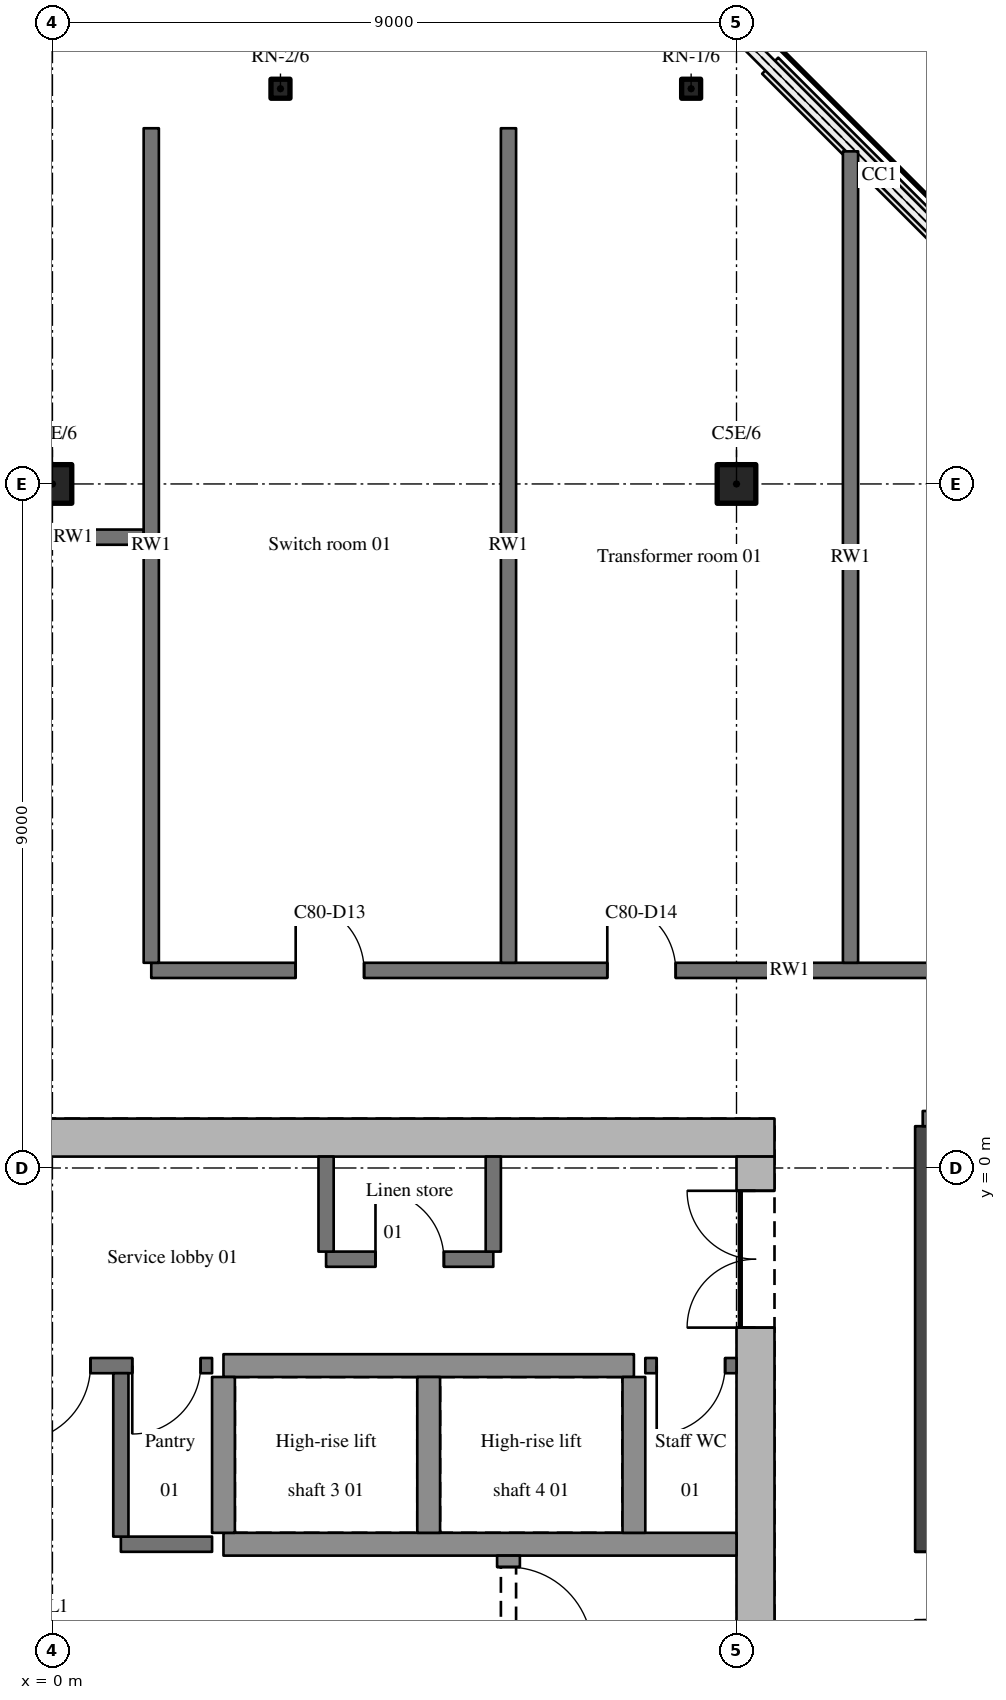
"""IFC4 building model, lengths in metres.
Left out: names, types, materials, properties, quantities, classifications, styles, units other than length and angle.
Written with IfcOpenShell. Run it as: python <this file> out.ifc"""

import sys

from ifc_helpers import new_model, si_unit, direction, frame, frame_2d, origin, origin_2d, place, context, subcontext, project, spatial, polyline, rectangle, hollow_rectangle, hollow_circle, outline, extrude, element, fill, save


model = new_model("IFC4")
c1 = context("Model", 3, precision=1e-05, world=origin(), true_north=direction((0.0, 1.0)))
c2 = subcontext(c1, "Body", "Model", "MODEL_VIEW")
j1 = project(units=[si_unit("LENGTHUNIT", "METRE"), si_unit("PLANEANGLEUNIT", "RADIAN")], contexts=[c1])
p1 = place(None, origin())
s1 = spatial("IfcSite", under=j1, at=p1, CompositionType="ELEMENT")
p2 = place(p1, origin())
s2 = spatial("IfcBuilding", under=s1, at=p2, CompositionType="ELEMENT")
p3 = place(p2, frame((0.0, 0.0, 297.3)))
s3 = spatial("IfcBuildingStorey", under=s2, at=p3, CompositionType="ELEMENT", Elevation=297.3)
for number, where, z_axis, x_axis in (
    (1, (0.0, 9.0, 0.0), (0.0, 0.0, 1.0), (1.0, 0.0, 0.0)),
    (2, (9.0, 9.0, 0.0), (0.0, 0.0, 1.0), (1.0, 0.0, 0.0)),
):
    element("IfcColumn", number, at=place(p3, frame(where, z_axis=z_axis, x_axis=x_axis)), inside=s3, PredefinedType="COLUMN", context=c2, shape_type="SweptSolid", body=[
        extrude(hollow_circle(Radius=0.254, WallThickness=0.025, at=origin_2d()), origin(), (0.0, 0.0, 1.0), 3.6),
    ])
for number, where, z_axis, x_axis in (
    (3, (8.403, 14.2, 0.0), (0.0, 0.0, 1.0), (1.0, 0.0, 0.0)),
    (4, (3.0, 14.2, 0.0), (0.0, 0.0, 1.0), (1.0, 0.0, 0.0)),
):
    element("IfcColumn", number, at=place(p3, frame(where, z_axis=z_axis, x_axis=x_axis)), inside=s3, PredefinedType="COLUMN", context=c2, shape_type="SweptSolid", body=[
        extrude(hollow_rectangle(XDim=0.25, YDim=0.25, WallThickness=0.02, InnerFilletRadius=0.03, OuterFilletRadius=0.05, at=origin_2d()), origin(), (0.0, 0.0, 1.0), 3.114),
    ])
p4 = place(p3, frame((-9.5, 0.4, 0.0), z_axis=(0.0, 0.0, 1.0), x_axis=(1.0, 0.0, 0.0)))
e5 = element("IfcWall", 5, at=p4, inside=s3, PredefinedType="SHEAR", context=c2, shape_type="SweptSolid", body=[
    extrude(outline(polyline([(0.0, 0.0), (19.0, 0.0), (19.0, 3.6), (0.0, 3.6), (0.0, 0.0)])), frame((0.0, 0.25, 0.0), z_axis=(0.0, -1.0, 0.0), x_axis=(1.0, 0.0, 0.0)), (0.0, 0.0, 1.0), 0.5),
])
p5 = place(p3, frame((9.25, -11.5, 0.0), z_axis=(0.0, 0.0, 1.0), x_axis=(0.0, 1.0, 0.0)))
e6 = element("IfcWall", 6, at=p5, inside=s3, PredefinedType="SHEAR", context=c2, shape_type="SweptSolid", body=[
    extrude(outline(polyline([(0.0, 0.0), (11.65, 0.0), (11.65, 3.6), (0.0, 3.6), (0.0, 0.0)])), frame((0.0, 0.25, 0.0), z_axis=(0.0, -1.0, 0.0), x_axis=(1.0, 0.0, 0.0)), (0.0, 0.0, 1.0), 0.5),
])
p6 = place(p5, frame((9.4, 0.0, 0.0)))
e7 = element("IfcOpeningElement", 7, at=p6, cuts=e6, PredefinedType="OPENING", context=c2, shape_type="SweptSolid", body=[
    extrude(rectangle(XDim=1.8, YDim=2.1, at=frame_2d((0.9, 1.05))), frame((0.0, 0.26, 0.0), z_axis=(0.0, -1.0, 0.0), x_axis=(1.0, 0.0, 0.0)), (0.0, 0.0, 1.0), 0.52),
])
p7 = place(p3, frame((0.9, -4.95, 0.0), z_axis=(0.0, 0.0, 1.0), x_axis=(1.0, 0.0, 0.0)))
e8 = element("IfcWall", 8, at=p7, inside=s3, PredefinedType="SOLIDWALL", context=c2, shape_type="SweptSolid", body=[
    extrude(rectangle(XDim=1.2, YDim=0.2, at=frame_2d((0.6, 0.0))), origin(), (0.0, 0.0, 1.0), 3.3),
])
p8 = place(p3, frame((2.25, -4.95, 0.0), z_axis=(0.0, 0.0, 1.0), x_axis=(1.0, 0.0, 0.0)))
e9 = element("IfcWall", 9, at=p8, inside=s3, PredefinedType="SHEAR", context=c2, shape_type="SweptSolid", body=[
    extrude(rectangle(XDim=6.75, YDim=0.3, at=frame_2d((3.375, 0.0))), origin(), (0.0, 0.0, 1.0), 3.6),
])
p9 = place(p3, frame((2.1, -2.6, 0.0), z_axis=(0.0, 0.0, 1.0), x_axis=(-1.0, 0.0, 0.0)))
e10 = element("IfcWall", 10, at=p9, inside=s3, PredefinedType="SOLIDWALL", context=c2, shape_type="SweptSolid", body=[
    extrude(rectangle(XDim=4.2, YDim=0.2, at=frame_2d((2.1, 0.0))), origin(), (0.0, 0.0, 1.0), 3.3),
])
p10 = place(p9, frame((1.6, 0.0, 0.0)))
e11 = element("IfcOpeningElement", 11, at=p10, cuts=e10, PredefinedType="OPENING", context=c2, shape_type="SweptSolid", body=[
    extrude(rectangle(XDim=1.0, YDim=2.1, at=frame_2d((0.5, 1.05))), frame((0.0, 0.11, 0.0), z_axis=(0.0, -1.0, 0.0), x_axis=(1.0, 0.0, 0.0)), (0.0, 0.0, 1.0), 0.22),
])
p11 = place(p9, frame((3.15, 0.0, 0.0)))
e12 = element("IfcOpeningElement", 12, at=p11, cuts=e10, PredefinedType="OPENING", context=c2, shape_type="SweptSolid", body=[
    extrude(rectangle(XDim=0.9, YDim=2.1, at=frame_2d((0.45, 1.05))), frame((0.0, 0.11, 0.0), z_axis=(0.0, -1.0, 0.0), x_axis=(1.0, 0.0, 0.0)), (0.0, 0.0, 1.0), 0.22),
])
p12 = place(p9, frame((0.15, 0.0, 0.0)))
e13 = element("IfcOpeningElement", 13, at=p12, cuts=e10, PredefinedType="OPENING", context=c2, shape_type="SweptSolid", body=[
    extrude(rectangle(XDim=0.9, YDim=2.1, at=frame_2d((0.45, 1.05))), frame((0.0, 0.11, 0.0), z_axis=(0.0, -1.0, 0.0), x_axis=(1.0, 0.0, 0.0)), (0.0, 0.0, 1.0), 0.22),
])
p13 = place(p3, frame((2.25, -2.6, 0.0), z_axis=(0.0, 0.0, 1.0), x_axis=(1.0, 0.0, 0.0)))
e14 = element("IfcWall", 14, at=p13, inside=s3, PredefinedType="SHEAR", context=c2, shape_type="SweptSolid", body=[
    extrude(rectangle(XDim=5.4, YDim=0.3, at=frame_2d((2.7, 0.0))), origin(), (0.0, 0.0, 1.0), 3.6),
])
p14 = place(p3, frame((9.0, -2.6, 0.0), z_axis=(0.0, 0.0, 1.0), x_axis=(-1.0, 0.0, 0.0)))
e15 = element("IfcWall", 15, at=p14, inside=s3, PredefinedType="SOLIDWALL", context=c2, shape_type="SweptSolid", body=[
    extrude(rectangle(XDim=1.2, YDim=0.2, at=frame_2d((0.6, 0.0))), origin(), (0.0, 0.0, 1.0), 3.3),
])
p15 = place(p14, frame((0.15, 0.0, 0.0)))
e16 = element("IfcOpeningElement", 16, at=p15, cuts=e15, PredefinedType="OPENING", context=c2, shape_type="SweptSolid", body=[
    extrude(rectangle(XDim=0.9, YDim=2.1, at=frame_2d((0.45, 1.05))), frame((0.0, 0.11, 0.0), z_axis=(0.0, -1.0, 0.0), x_axis=(1.0, 0.0, 0.0)), (0.0, 0.0, 1.0), 0.22),
])
p16 = place(p3, frame((3.6, -1.2, 0.0), z_axis=(0.0, 0.0, 1.0), x_axis=(1.0, 0.0, 0.0)))
e17 = element("IfcWall", 17, at=p16, inside=s3, PredefinedType="SOLIDWALL", context=c2, shape_type="SweptSolid", body=[
    extrude(rectangle(XDim=2.2, YDim=0.2, at=frame_2d((1.1, 0.0))), origin(), (0.0, 0.0, 1.0), 3.3),
])
p17 = place(p16, frame((0.65, 0.0, 0.0)))
e18 = element("IfcOpeningElement", 18, at=p17, cuts=e17, PredefinedType="OPENING", context=c2, shape_type="SweptSolid", body=[
    extrude(rectangle(XDim=0.9, YDim=2.1, at=frame_2d((0.45, 1.05))), frame((0.0, 0.11, 0.0), z_axis=(0.0, -1.0, 0.0), x_axis=(1.0, 0.0, 0.0)), (0.0, 0.0, 1.0), 0.22),
])
p18 = place(p3, frame((18.1, 0.65, 0.0), z_axis=(0.0, 0.0, 1.0), x_axis=(-1.0, 0.0, 0.0)))
e19 = element("IfcWall", 19, at=p18, inside=s3, PredefinedType="SOLIDWALL", context=c2, shape_type="SweptSolid", body=[
    extrude(rectangle(XDim=6.65, YDim=0.2, at=frame_2d((3.325, 0.0))), origin(), (0.0, 0.0, 1.0), 2.66),
])
p19 = place(p18, frame((2.875, 0.0, 0.0)))
e20 = element("IfcOpeningElement", 20, at=p19, cuts=e19, PredefinedType="OPENING", context=c2, shape_type="SweptSolid", body=[
    extrude(rectangle(XDim=0.9, YDim=2.1, at=frame_2d((0.45, 1.05))), frame((0.0, 0.11, 0.0), z_axis=(0.0, -1.0, 0.0), x_axis=(1.0, 0.0, 0.0)), (0.0, 0.0, 1.0), 0.22),
])
p20 = place(p3, frame((1.3, 2.6, 0.0), z_axis=(0.0, 0.0, 1.0), x_axis=(1.0, 0.0, 0.0)))
e21 = element("IfcWall", 21, at=p20, inside=s3, PredefinedType="SOLIDWALL", context=c2, shape_type="SweptSolid", body=[
    extrude(rectangle(XDim=16.8, YDim=0.2, at=frame_2d((8.4, 0.0))), origin(), (0.0, 0.0, 1.0), 2.66),
])
p21 = place(p20, frame((1.9, 0.0, 0.0)))
e22 = element("IfcOpeningElement", 22, at=p21, cuts=e21, PredefinedType="OPENING", context=c2, shape_type="SweptSolid", body=[
    extrude(rectangle(XDim=0.9, YDim=2.1, at=frame_2d((0.45, 1.05))), frame((0.0, 0.11, 0.0), z_axis=(0.0, -1.0, 0.0), x_axis=(1.0, 0.0, 0.0)), (0.0, 0.0, 1.0), 0.22),
])
p22 = place(p20, frame((6.0, 0.0, 0.0)))
e23 = element("IfcOpeningElement", 23, at=p22, cuts=e21, PredefinedType="OPENING", context=c2, shape_type="SweptSolid", body=[
    extrude(rectangle(XDim=0.9, YDim=2.1, at=frame_2d((0.45, 1.05))), frame((0.0, 0.11, 0.0), z_axis=(0.0, -1.0, 0.0), x_axis=(1.0, 0.0, 0.0)), (0.0, 0.0, 1.0), 0.22),
])
p23 = place(p20, frame((13.025, 0.0, 0.0)))
e24 = element("IfcOpeningElement", 24, at=p23, cuts=e21, PredefinedType="OPENING", context=c2, shape_type="SweptSolid", body=[
    extrude(rectangle(XDim=0.9, YDim=2.1, at=frame_2d((0.45, 1.05))), frame((0.0, 0.11, 0.0), z_axis=(0.0, -1.0, 0.0), x_axis=(1.0, 0.0, 0.0)), (0.0, 0.0, 1.0), 0.22),
])
p24 = place(p3, frame((-0.65, 8.3, 0.0), z_axis=(0.0, 0.0, 1.0), x_axis=(1.0, 0.0, 0.0)))
e25 = element("IfcWall", 25, at=p24, inside=s3, PredefinedType="SOLIDWALL", context=c2, shape_type="SweptSolid", body=[
    extrude(rectangle(XDim=1.85, YDim=0.2, at=frame_2d((0.925, 0.0))), origin(), (0.0, 0.0, 1.0), 2.66),
])
p25 = place(p3, frame((0.9, -4.85, 0.0), z_axis=(0.0, 0.0, 1.0), x_axis=(0.0, 1.0, 0.0)))
e26 = element("IfcWall", 26, at=p25, inside=s3, PredefinedType="SOLIDWALL", context=c2, shape_type="SweptSolid", body=[
    extrude(rectangle(XDim=2.15, YDim=0.2, at=frame_2d((1.075, 0.0))), origin(), (0.0, 0.0, 1.0), 3.3),
])
p26 = place(p3, frame((1.3, 2.7, 0.0), z_axis=(0.0, 0.0, 1.0), x_axis=(0.0, 1.0, 0.0)))
e27 = element("IfcWall", 27, at=p26, inside=s3, PredefinedType="SOLIDWALL", context=c2, shape_type="SweptSolid", body=[
    extrude(rectangle(XDim=10.98, YDim=0.2, at=frame_2d((5.49, 0.0))), origin(), (0.0, 0.0, 1.0), 2.66),
])
p27 = place(p3, frame((2.25, -4.8, 0.0), z_axis=(0.0, 0.0, 1.0), x_axis=(0.0, 1.0, 0.0)))
e28 = element("IfcWall", 28, at=p27, inside=s3, PredefinedType="SHEAR", context=c2, shape_type="SweptSolid", body=[
    extrude(rectangle(XDim=2.05, YDim=0.3, at=frame_2d((1.025, 0.0))), origin(), (0.0, 0.0, 1.0), 3.6),
])
p28 = place(p3, frame((3.6, -1.1, 0.0), z_axis=(0.0, 0.0, 1.0), x_axis=(0.0, 1.0, 0.0)))
e29 = element("IfcWall", 29, at=p28, inside=s3, PredefinedType="SOLIDWALL", context=c2, shape_type="SweptSolid", body=[
    extrude(rectangle(XDim=1.25, YDim=0.2, at=frame_2d((0.625, 0.0))), origin(), (0.0, 0.0, 1.0), 3.3),
])
p29 = place(p3, frame((4.95, -4.8, 0.0), z_axis=(0.0, 0.0, 1.0), x_axis=(0.0, 1.0, 0.0)))
e30 = element("IfcWall", 30, at=p29, inside=s3, PredefinedType="SHEAR", context=c2, shape_type="SweptSolid", body=[
    extrude(rectangle(XDim=2.05, YDim=0.3, at=frame_2d((1.025, 0.0))), origin(), (0.0, 0.0, 1.0), 3.6),
])
p30 = place(p3, frame((5.8, -1.1, 0.0), z_axis=(0.0, 0.0, 1.0), x_axis=(0.0, 1.0, 0.0)))
e31 = element("IfcWall", 31, at=p30, inside=s3, PredefinedType="SOLIDWALL", context=c2, shape_type="SweptSolid", body=[
    extrude(rectangle(XDim=1.25, YDim=0.2, at=frame_2d((0.625, 0.0))), origin(), (0.0, 0.0, 1.0), 3.3),
])
p31 = place(p3, frame((6.0, -5.1, 0.0), z_axis=(0.0, 0.0, 1.0), x_axis=(0.0, -1.0, 0.0)))
e32 = element("IfcWall", 32, at=p31, inside=s3, PredefinedType="SHEAR", context=c2, shape_type="SweptSolid", body=[
    extrude(rectangle(XDim=6.4, YDim=0.3, at=frame_2d((3.2, 0.0))), origin(), (0.0, 0.0, 1.0), 3.6),
])
p32 = place(p31, frame((0.15, 0.0, 0.0)))
e33 = element("IfcOpeningElement", 33, at=p32, cuts=e32, PredefinedType="OPENING", context=c2, shape_type="SweptSolid", body=[
    extrude(rectangle(XDim=1.1, YDim=2.1, at=frame_2d((0.55, 1.05))), frame((0.0, 0.16, 0.0), z_axis=(0.0, -1.0, 0.0), x_axis=(1.0, 0.0, 0.0)), (0.0, 0.0, 1.0), 0.32),
])
p33 = place(p3, frame((6.0, 2.7, 0.0), z_axis=(0.0, 0.0, 1.0), x_axis=(0.0, 1.0, 0.0)))
e34 = element("IfcWall", 34, at=p33, inside=s3, PredefinedType="SOLIDWALL", context=c2, shape_type="SweptSolid", body=[
    extrude(rectangle(XDim=10.98, YDim=0.2, at=frame_2d((5.49, 0.0))), origin(), (0.0, 0.0, 1.0), 2.66),
])
p34 = place(p3, frame((7.65, -4.8, 0.0), z_axis=(0.0, 0.0, 1.0), x_axis=(0.0, 1.0, 0.0)))
e35 = element("IfcWall", 35, at=p34, inside=s3, PredefinedType="SHEAR", context=c2, shape_type="SweptSolid", body=[
    extrude(rectangle(XDim=2.05, YDim=0.3, at=frame_2d((1.025, 0.0))), origin(), (0.0, 0.0, 1.0), 3.6),
])
p35 = place(p3, frame((10.5, 2.7, 0.0), z_axis=(0.0, 0.0, 1.0), x_axis=(0.0, 1.0, 0.0)))
e36 = element("IfcWall", 36, at=p35, inside=s3, PredefinedType="SOLIDWALL", context=c2, shape_type="SweptSolid", body=[
    extrude(rectangle(XDim=10.676, YDim=0.2, at=frame_2d((5.338, 0.0))), origin(), (0.0, 0.0, 1.0), 2.66),
])
p36 = place(p3, frame((11.45, 0.55, 0.0), z_axis=(0.0, 0.0, 1.0), x_axis=(0.0, -1.0, 0.0)))
e37 = element("IfcWall", 37, at=p36, inside=s3, PredefinedType="SOLIDWALL", context=c2, shape_type="SweptSolid", body=[
    extrude(rectangle(XDim=15.65, YDim=0.2, at=frame_2d((7.825, 0.0))), origin(), (0.0, 0.0, 1.0), 2.46),
])
p37 = place(p36, frame((13.65, 0.0, 0.0)))
e38 = element("IfcOpeningElement", 38, at=p37, cuts=e37, PredefinedType="OPENING", context=c2, shape_type="SweptSolid", body=[
    extrude(rectangle(XDim=0.9, YDim=2.1, at=frame_2d((0.45, 1.05))), frame((0.0, 0.11, 0.0), z_axis=(0.0, -1.0, 0.0), x_axis=(1.0, 0.0, 0.0)), (0.0, 0.0, 1.0), 0.22),
])
p38 = place(p36, frame((5.6, 0.0, 0.0)))
e39 = element("IfcOpeningElement", 39, at=p38, cuts=e37, PredefinedType="OPENING", context=c2, shape_type="SweptSolid", body=[
    extrude(rectangle(XDim=0.9, YDim=2.1, at=frame_2d((0.45, 1.05))), frame((0.0, 0.11, 0.0), z_axis=(0.0, -1.0, 0.0), x_axis=(1.0, 0.0, 0.0)), (0.0, 0.0, 1.0), 0.22),
])
p39 = place(p6, origin())
e40 = element("IfcDoor", 40, at=p39, inside=s3, OperationType="DOUBLE_DOOR_SINGLE_SWING", PredefinedType="DOOR", context=c2, shape_type="SweptSolid", body=[
    extrude(rectangle(XDim=1.8, YDim=2.1, at=frame_2d((0.9, 1.05))), frame((0.0, 0.025, 0.0), z_axis=(0.0, -1.0, 0.0), x_axis=(1.0, 0.0, 0.0)), (0.0, 0.0, 1.0), 0.05),
])
fill(e7, e40)
p40 = place(p10, origin())
e41 = element("IfcDoor", 41, at=p40, inside=s3, OperationType="SINGLE_SWING_RIGHT", PredefinedType="DOOR", context=c2, shape_type="SweptSolid", body=[
    extrude(rectangle(XDim=1.0, YDim=2.1, at=frame_2d((0.5, 1.05))), frame((0.0, 0.025, 0.0), z_axis=(0.0, -1.0, 0.0), x_axis=(1.0, 0.0, 0.0)), (0.0, 0.0, 1.0), 0.05),
])
fill(e11, e41)
p41 = place(p32, origin())
e42 = element("IfcDoor", 42, at=p41, inside=s3, OperationType="SINGLE_SWING_RIGHT", PredefinedType="DOOR", context=c2, shape_type="SweptSolid", body=[
    extrude(rectangle(XDim=1.1, YDim=2.1, at=frame_2d((0.55, 1.05))), frame((0.0, 0.025, 0.0), z_axis=(0.0, -1.0, 0.0), x_axis=(1.0, 0.0, 0.0)), (0.0, 0.0, 1.0), 0.05),
])
fill(e33, e42)
p42 = place(p12, origin())
e43 = element("IfcDoor", 43, at=p42, inside=s3, OperationType="SINGLE_SWING_RIGHT", PredefinedType="DOOR", context=c2, shape_type="SweptSolid", body=[
    extrude(rectangle(XDim=0.9, YDim=2.1, at=frame_2d((0.45, 1.05))), frame((0.0, 0.025, 0.0), z_axis=(0.0, -1.0, 0.0), x_axis=(1.0, 0.0, 0.0)), (0.0, 0.0, 1.0), 0.05),
])
fill(e13, e43)
p43 = place(p15, origin())
e44 = element("IfcDoor", 44, at=p43, inside=s3, OperationType="SINGLE_SWING_RIGHT", PredefinedType="DOOR", context=c2, shape_type="SweptSolid", body=[
    extrude(rectangle(XDim=0.9, YDim=2.1, at=frame_2d((0.45, 1.05))), frame((0.0, 0.025, 0.0), z_axis=(0.0, -1.0, 0.0), x_axis=(1.0, 0.0, 0.0)), (0.0, 0.0, 1.0), 0.05),
])
fill(e16, e44)
p44 = place(p38, origin())
e45 = element("IfcDoor", 45, at=p44, inside=s3, OperationType="SINGLE_SWING_RIGHT", PredefinedType="DOOR", context=c2, shape_type="SweptSolid", body=[
    extrude(rectangle(XDim=0.9, YDim=2.1, at=frame_2d((0.45, 1.05))), frame((0.0, 0.025, 0.0), z_axis=(0.0, -1.0, 0.0), x_axis=(1.0, 0.0, 0.0)), (0.0, 0.0, 1.0), 0.05),
])
fill(e39, e45)
p45 = place(p21, origin())
e46 = element("IfcDoor", 46, at=p45, inside=s3, OperationType="SINGLE_SWING_LEFT", PredefinedType="DOOR", context=c2, shape_type="SweptSolid", body=[
    extrude(rectangle(XDim=0.9, YDim=2.1, at=frame_2d((0.45, 1.05))), frame((0.0, 0.025, 0.0), z_axis=(0.0, -1.0, 0.0), x_axis=(1.0, 0.0, 0.0)), (0.0, 0.0, 1.0), 0.05),
])
fill(e22, e46)
p46 = place(p22, origin())
e47 = element("IfcDoor", 47, at=p46, inside=s3, OperationType="SINGLE_SWING_LEFT", PredefinedType="DOOR", context=c2, shape_type="SweptSolid", body=[
    extrude(rectangle(XDim=0.9, YDim=2.1, at=frame_2d((0.45, 1.05))), frame((0.0, 0.025, 0.0), z_axis=(0.0, -1.0, 0.0), x_axis=(1.0, 0.0, 0.0)), (0.0, 0.0, 1.0), 0.05),
])
fill(e23, e47)
p47 = place(p17, origin())
e48 = element("IfcDoor", 48, at=p47, inside=s3, OperationType="SINGLE_SWING_LEFT", PredefinedType="DOOR", context=c2, shape_type="SweptSolid", body=[
    extrude(rectangle(XDim=0.9, YDim=2.1, at=frame_2d((0.45, 1.05))), frame((0.0, 0.025, 0.0), z_axis=(0.0, -1.0, 0.0), x_axis=(1.0, 0.0, 0.0)), (0.0, 0.0, 1.0), 0.05),
])
fill(e18, e48)
save(model, sys.argv[1])
